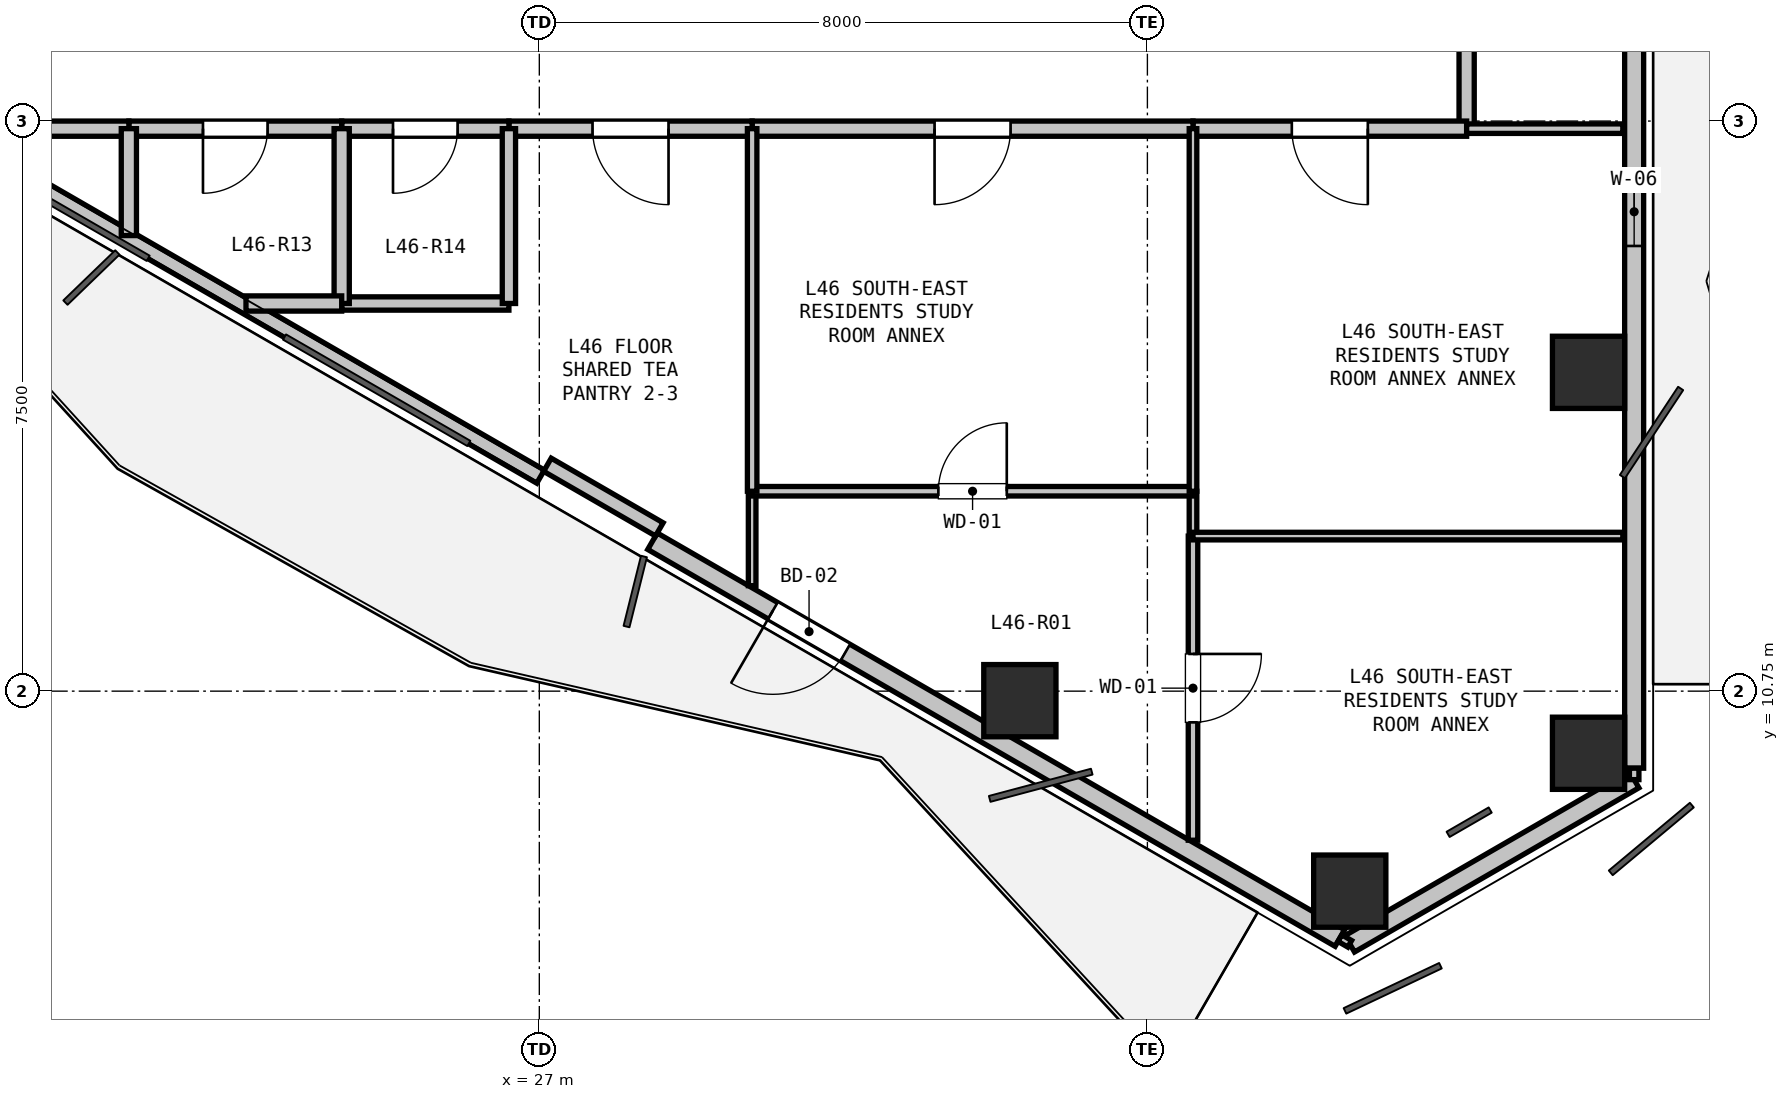
"""IFC4 building model, lengths in metres.
Left out: names, types, materials, properties, quantities, classifications, styles, units other than length and angle.
Written with IfcOpenShell. Run it as: python <this file> out.ifc"""

import sys

from ifc_helpers import new_model, si_unit, direction, frame, frame_2d, origin, origin_2d, place, context, subcontext, project, spatial, rectangle, hollow_rectangle, extrude, element, fill, save


model = new_model("IFC4")
c1 = context("Model", 3, precision=1e-05, world=origin(), true_north=direction((0.0, 1.0)))
c2 = subcontext(c1, "Body", "Model", "MODEL_VIEW")
j1 = project(units=[si_unit("LENGTHUNIT", "METRE"), si_unit("PLANEANGLEUNIT", "RADIAN")], contexts=[c1])
p1 = place(None, origin())
s1 = spatial("IfcSite", under=j1, at=p1, CompositionType="ELEMENT")
p2 = place(p1, origin())
s2 = spatial("IfcBuilding", under=s1, at=p2, CompositionType="ELEMENT")
p3 = place(p2, frame((0.0, 0.0, 167.4)))
s3 = spatial("IfcBuildingStorey", under=s2, at=p3, CompositionType="ELEMENT", Elevation=167.4)
for number, where, z_axis, x_axis in (
    (1, (40.804, 14.944, -0.23), (0.0, 0.0, 1.0), (1.0, 0.0, 0.0)),
    (2, (40.804, 9.933, -0.23), (0.0, 0.0, 1.0), (1.0, 0.0, 0.0)),
    (3, (37.662, 8.119, -0.23), (0.0, 0.0, 1.0), (1.0, 0.0, 0.0)),
    (4, (33.322, 10.625, -0.23), (0.0, 0.0, 1.0), (1.0, 0.0, 0.0)),
):
    element("IfcColumn", number, at=place(p3, frame(where, z_axis=z_axis, x_axis=x_axis)), inside=s3, PredefinedType="COLUMN", context=c2, shape_type="SweptSolid", body=[
        extrude(hollow_rectangle(XDim=0.95, YDim=0.95, WallThickness=0.028, at=origin_2d()), origin(), (0.0, 0.0, 1.0), 3.53),
    ])
p4 = place(p3, frame((41.404, 9.586, 0.0), z_axis=(0.0, 0.0, 1.0), x_axis=(-0.866047252008, -0.499962155857, 0.0)))
e5 = element("IfcWall", 5, at=p4, inside=s3, PredefinedType="SOLIDWALL", context=c2, shape_type="SweptSolid", body=[
    extrude(rectangle(XDim=4.32, YDim=0.25, at=frame_2d((2.16, 0.0))), origin(), (0.0, 0.0, 1.0), 2.64),
])
p5 = place(p3, frame((41.404, 20.179, 0.0), z_axis=(0.0, 0.0, 1.0), x_axis=(0.0, -1.0, 0.0)))
e6 = element("IfcWall", 6, at=p5, inside=s3, PredefinedType="SOLIDWALL", context=c2, shape_type="SweptSolid", body=[
    extrude(rectangle(XDim=10.442, YDim=0.25, at=frame_2d((5.221, 0.0))), origin(), (0.0, 0.0, 1.0), 2.64),
])
p6 = place(p5, frame((2.672, 0.0, 0.9)))
e7 = element("IfcOpeningElement", 7, at=p6, cuts=e6, PredefinedType="OPENING", context=c2, shape_type="SweptSolid", body=[
    extrude(rectangle(XDim=0.9, YDim=1.4, at=frame_2d((0.45, 0.7))), frame((0.0, 0.135, 0.0), z_axis=(0.0, -1.0, 0.0), x_axis=(1.0, 0.0, 0.0)), (0.0, 0.0, 1.0), 0.27),
])
p7 = place(p3, frame((37.532, 7.501, 0.0), z_axis=(0.0, 0.0, 1.0), x_axis=(-0.866027516296, 0.499996341005, 0.0)))
e8 = element("IfcWall", 8, at=p7, inside=s3, PredefinedType="SOLIDWALL", context=c2, shape_type="SweptSolid", body=[
    extrude(rectangle(XDim=10.442, YDim=0.25, at=frame_2d((5.221, 0.0))), origin(), (0.0, 0.0, 1.0), 2.64),
])
p8 = place(p7, frame((7.514, 0.0, 0.0)))
e9 = element("IfcOpeningElement", 9, at=p8, cuts=e8, PredefinedType="OPENING", context=c2, shape_type="SweptSolid", body=[
    extrude(rectangle(XDim=1.1, YDim=2.1, at=frame_2d((0.55, 1.05))), frame((0.0, 0.135, 0.0), z_axis=(0.0, -1.0, 0.0), x_axis=(1.0, 0.0, 0.0)), (0.0, 0.0, 1.0), 0.27),
])
p9 = place(p3, frame((27.017, 13.573, 0.0), z_axis=(0.0, 0.0, 1.0), x_axis=(-0.866026169916, 0.499998673018, 0.0)))
e10 = element("IfcWall", 10, at=p9, inside=s3, PredefinedType="PARAPET", context=c2, shape_type="SweptSolid", body=[
    extrude(rectangle(XDim=9.742, YDim=0.2, at=frame_2d((4.871, 0.0))), origin(), (0.0, 0.0, 1.0), 0.2),
])
p10 = place(p3, frame((28.579, 12.878, 0.0), z_axis=(0.0, 0.0, 1.0), x_axis=(-0.866087547558, 0.499892348375, 0.0)))
e11 = element("IfcWall", 11, at=p10, inside=s3, PredefinedType="PARAPET", context=c2, shape_type="SweptSolid", body=[
    extrude(rectangle(XDim=1.7, YDim=0.2, at=frame_2d((0.85, 0.0))), origin(), (0.0, 0.0, 1.0), 2.64),
])
p11 = place(p3, frame((39.2, 20.75, 0.0), z_axis=(0.0, 0.0, 1.0), x_axis=(0.0, -1.0, 0.0)))
e12 = element("IfcWall", 12, at=p11, inside=s3, PredefinedType="PARTITIONING", context=c2, shape_type="SweptSolid", body=[
    extrude(rectangle(XDim=2.6, YDim=0.2, at=frame_2d((1.3, 0.0))), origin(), (0.0, 0.0, 1.0), 3.02),
])
p12 = place(p3, frame((39.2, 18.15, 0.0), z_axis=(0.0, 0.0, 1.0), x_axis=(-1.0, 0.0, 0.0)))
e13 = element("IfcWall", 13, at=p12, inside=s3, PredefinedType="PARTITIONING", context=c2, shape_type="SweptSolid", body=[
    extrude(rectangle(XDim=3.6, YDim=0.2, at=frame_2d((1.8, 0.0))), origin(), (0.0, 0.0, 1.0), 2.469),
])
p13 = place(p12, frame((1.3, 0.0, 0.0)))
e14 = element("IfcOpeningElement", 14, at=p13, cuts=e13, PredefinedType="OPENING", context=c2, shape_type="SweptSolid", body=[
    extrude(rectangle(XDim=1.0, YDim=2.15, at=frame_2d((0.5, 1.075))), frame((0.0, 0.11, 0.0), z_axis=(0.0, -1.0, 0.0), x_axis=(1.0, 0.0, 0.0)), (0.0, 0.0, 1.0), 0.22),
])
p14 = place(p3, frame((35.6, 18.15, 0.0), z_axis=(0.0, 0.0, 1.0), x_axis=(-1.0, 0.0, 0.0)))
e15 = element("IfcWall", 15, at=p14, inside=s3, PredefinedType="PARTITIONING", context=c2, shape_type="SweptSolid", body=[
    extrude(rectangle(XDim=5.8, YDim=0.2, at=frame_2d((2.9, 0.0))), origin(), (0.0, 0.0, 1.0), 3.02),
])
p15 = place(p14, frame((2.4, 0.0, 0.0)))
e16 = element("IfcOpeningElement", 16, at=p15, cuts=e15, PredefinedType="OPENING", context=c2, shape_type="SweptSolid", body=[
    extrude(rectangle(XDim=1.0, YDim=2.15, at=frame_2d((0.5, 1.075))), frame((0.0, 0.11, 0.0), z_axis=(0.0, -1.0, 0.0), x_axis=(1.0, 0.0, 0.0)), (0.0, 0.0, 1.0), 0.22),
])
p16 = place(p3, frame((29.8, 18.15, 0.0), z_axis=(0.0, 0.0, 1.0), x_axis=(-1.0, 0.0, 0.0)))
e17 = element("IfcWall", 17, at=p16, inside=s3, PredefinedType="PARTITIONING", context=c2, shape_type="SweptSolid", body=[
    extrude(rectangle(XDim=3.2, YDim=0.2, at=frame_2d((1.6, 0.0))), origin(), (0.0, 0.0, 1.0), 3.02),
])
p17 = place(p16, frame((1.1, 0.0, 0.0)))
e18 = element("IfcOpeningElement", 18, at=p17, cuts=e17, PredefinedType="OPENING", context=c2, shape_type="SweptSolid", body=[
    extrude(rectangle(XDim=1.0, YDim=2.15, at=frame_2d((0.5, 1.075))), frame((0.0, 0.11, 0.0), z_axis=(0.0, -1.0, 0.0), x_axis=(1.0, 0.0, 0.0)), (0.0, 0.0, 1.0), 0.22),
])
p18 = place(p3, frame((26.6, 18.15, 0.0), z_axis=(0.0, 0.0, 1.0), x_axis=(-1.0, 0.0, 0.0)))
e19 = element("IfcWall", 19, at=p18, inside=s3, PredefinedType="PARTITIONING", context=c2, shape_type="SweptSolid", body=[
    extrude(rectangle(XDim=2.2, YDim=0.2, at=frame_2d((1.1, 0.0))), origin(), (0.0, 0.0, 1.0), 2.469),
])
p19 = place(p18, frame((0.675, 0.0, 0.0)))
e20 = element("IfcOpeningElement", 20, at=p19, cuts=e19, PredefinedType="OPENING", context=c2, shape_type="SweptSolid", body=[
    extrude(rectangle(XDim=0.85, YDim=2.1, at=frame_2d((0.425, 1.05))), frame((0.0, 0.11, 0.0), z_axis=(0.0, -1.0, 0.0), x_axis=(1.0, 0.0, 0.0)), (0.0, 0.0, 1.0), 0.22),
])
p20 = place(p3, frame((24.4, 18.15, 0.0), z_axis=(0.0, 0.0, 1.0), x_axis=(-1.0, 0.0, 0.0)))
e21 = element("IfcWall", 21, at=p20, inside=s3, PredefinedType="PARTITIONING", context=c2, shape_type="SweptSolid", body=[
    extrude(rectangle(XDim=2.8, YDim=0.2, at=frame_2d((1.4, 0.0))), origin(), (0.0, 0.0, 1.0), 2.469),
])
p21 = place(p20, frame((0.975, 0.0, 0.0)))
e22 = element("IfcOpeningElement", 22, at=p21, cuts=e21, PredefinedType="OPENING", context=c2, shape_type="SweptSolid", body=[
    extrude(rectangle(XDim=0.85, YDim=2.1, at=frame_2d((0.425, 1.05))), frame((0.0, 0.11, 0.0), z_axis=(0.0, -1.0, 0.0), x_axis=(1.0, 0.0, 0.0)), (0.0, 0.0, 1.0), 0.22),
])
p22 = place(p3, frame((21.6, 18.15, 0.0), z_axis=(0.0, 0.0, 1.0), x_axis=(-1.0, 0.0, 0.0)))
e23 = element("IfcWall", 23, at=p22, inside=s3, PredefinedType="PARTITIONING", context=c2, shape_type="SweptSolid", body=[
    extrude(rectangle(XDim=1.6, YDim=0.2, at=frame_2d((0.8, 0.0))), origin(), (0.0, 0.0, 1.0), 2.365),
])
p23 = place(p3, frame((26.6, 15.85, 0.0), z_axis=(0.0, 0.0, 1.0), x_axis=(-1.0, 0.0, 0.0)))
e24 = element("IfcWall", 24, at=p23, inside=s3, PredefinedType="PLUMBINGWALL", context=c2, shape_type="SweptSolid", body=[
    extrude(rectangle(XDim=2.2, YDim=0.175, at=frame_2d((1.1, 0.0))), origin(), (0.0, 0.0, 1.0), 2.365),
])
p24 = place(p3, frame((24.4, 15.85, 0.0), z_axis=(0.0, 0.0, 1.0), x_axis=(0.0, 1.0, 0.0)))
e25 = element("IfcWall", 25, at=p24, inside=s3, PredefinedType="PARTITIONING", context=c2, shape_type="SweptSolid", body=[
    extrude(rectangle(XDim=2.3, YDim=0.2, at=frame_2d((1.15, 0.0))), origin(), (0.0, 0.0, 1.0), 2.365),
])
p25 = place(p3, frame((26.6, 18.15, 0.0), z_axis=(0.0, 0.0, 1.0), x_axis=(0.0, -1.0, 0.0)))
e26 = element("IfcWall", 26, at=p25, inside=s3, PredefinedType="PLUMBINGWALL", context=c2, shape_type="SweptSolid", body=[
    extrude(rectangle(XDim=2.3, YDim=0.175, at=frame_2d((1.15, 0.0))), origin(), (0.0, 0.0, 1.0), 2.469),
])
p26 = place(p3, frame((35.6, 13.38, 0.0), z_axis=(0.0, 0.0, 1.0), x_axis=(0.0, -1.0, 0.0)))
e27 = element("IfcWall", 27, at=p26, inside=s3, PredefinedType="PARTITIONING", context=c2, shape_type="SweptSolid", body=[
    extrude(rectangle(XDim=0.59, YDim=0.1, at=frame_2d((0.295, 0.0))), origin(), (0.0, 0.0, 1.0), 3.02),
])
p27 = place(p3, frame((35.6, 12.79, 0.0), z_axis=(0.0, 0.0, 1.0), x_axis=(0.0, -1.0, 0.0)))
e28 = element("IfcWall", 28, at=p27, inside=s3, PredefinedType="PARTITIONING", context=c2, shape_type="SweptSolid", body=[
    extrude(rectangle(XDim=4.001, YDim=0.125, at=frame_2d((2.0, 0.0))), origin(), (0.0, 0.0, 1.0), 2.685),
])
p28 = place(p27, frame((1.551, 0.0, 0.0)))
e29 = element("IfcOpeningElement", 29, at=p28, cuts=e28, PredefinedType="OPENING", context=c2, shape_type="SweptSolid", body=[
    extrude(rectangle(XDim=0.9, YDim=2.1, at=frame_2d((0.45, 1.05))), frame((0.0, 0.073, 0.0), z_axis=(0.0, -1.0, 0.0), x_axis=(1.0, 0.0, 0.0)), (0.0, 0.0, 1.0), 0.145),
])
p29 = place(p3, frame((29.8, 12.137, 0.0), z_axis=(0.0, 0.0, 1.0), x_axis=(0.0, 1.0, 0.0)))
e30 = element("IfcWall", 30, at=p29, inside=s3, PredefinedType="PARTITIONING", context=c2, shape_type="SweptSolid", body=[
    extrude(rectangle(XDim=1.242, YDim=0.1, at=frame_2d((0.621, 0.0))), origin(), (0.0, 0.0, 1.0), 2.365),
])
p30 = place(p3, frame((29.8, 13.38, 0.0), z_axis=(0.0, 0.0, 1.0), x_axis=(1.0, 0.0, 0.0)))
e31 = element("IfcWall", 31, at=p30, inside=s3, PredefinedType="PARTITIONING", context=c2, shape_type="SweptSolid", body=[
    extrude(rectangle(XDim=5.8, YDim=0.125, at=frame_2d((2.9, 0.0))), origin(), (0.0, 0.0, 1.0), 2.469),
])
p31 = place(p30, frame((2.45, 0.0, 0.0)))
e32 = element("IfcOpeningElement", 32, at=p31, cuts=e31, PredefinedType="OPENING", context=c2, shape_type="SweptSolid", body=[
    extrude(rectangle(XDim=0.9, YDim=2.1, at=frame_2d((0.45, 1.05))), frame((0.0, 0.073, 0.0), z_axis=(0.0, -1.0, 0.0), x_axis=(1.0, 0.0, 0.0)), (0.0, 0.0, 1.0), 0.145),
])
p32 = place(p3, frame((35.6, 18.15, 0.0), z_axis=(0.0, 0.0, 1.0), x_axis=(0.0, -1.0, 0.0)))
e33 = element("IfcWall", 33, at=p32, inside=s3, PredefinedType="PARTITIONING", context=c2, shape_type="SweptSolid", body=[
    extrude(rectangle(XDim=4.77, YDim=0.1, at=frame_2d((2.385, 0.0))), origin(), (0.0, 0.0, 1.0), 3.02),
])
p33 = place(p3, frame((29.8, 13.38, 0.0), z_axis=(0.0, 0.0, 1.0), x_axis=(0.0, 1.0, 0.0)))
e34 = element("IfcWall", 34, at=p33, inside=s3, PredefinedType="PARTITIONING", context=c2, shape_type="SweptSolid", body=[
    extrude(rectangle(XDim=4.77, YDim=0.125, at=frame_2d((2.385, 0.0))), origin(), (0.0, 0.0, 1.0), 2.469),
])
p34 = place(p3, frame((35.6, 12.79, 0.0), z_axis=(0.0, 0.0, 1.0), x_axis=(1.0, 0.0, 0.0)))
e35 = element("IfcWall", 35, at=p34, inside=s3, PredefinedType="PARTITIONING", context=c2, shape_type="SweptSolid", body=[
    extrude(rectangle(XDim=5.655, YDim=0.1, at=frame_2d((2.827, 0.0))), origin(), (0.0, 0.0, 1.0), 2.469),
])
p35 = place(p3, frame((41.404, 9.736, 0.0), z_axis=(0.0, 0.0, 1.0), x_axis=(0.0, -1.0, 0.0)))
e36 = element("IfcWall", 36, at=p35, inside=s3, PredefinedType="PARTITIONING", context=c2, shape_type="SweptSolid", body=[
    extrude(rectangle(XDim=0.15, YDim=0.125, at=frame_2d((0.075, 0.0))), origin(), (0.0, 0.0, 1.0), 3.02),
])
p36 = place(p3, frame((37.662, 7.426, 0.0), z_axis=(0.0, 0.0, 1.0), x_axis=(-0.866131372301, 0.499816412211, 0.0)))
e37 = element("IfcWall", 37, at=p36, inside=s3, PredefinedType="PARTITIONING", context=c2, shape_type="SweptSolid", body=[
    extrude(rectangle(XDim=0.15, YDim=0.1, at=frame_2d((0.075, 0.0))), origin(), (0.0, 0.0, 1.0), 3.02),
])
p37 = place(p3, frame((39.2, 18.15, 0.0), z_axis=(0.0, 0.0, 1.0), x_axis=(1.0, 0.0, 0.0)))
e38 = element("IfcWall", 38, at=p37, inside=s3, PredefinedType="PARTITIONING", context=c2, shape_type="SweptSolid", body=[
    extrude(rectangle(XDim=2.055, YDim=0.125, at=frame_2d((1.027, 0.0))), origin(), (0.0, 0.0, 1.0), 2.365),
])
p38 = place(p3, frame((24.4, 15.85, 0.0), z_axis=(0.0, 0.0, 1.0), x_axis=(-1.0, 0.0, 0.0)))
e39 = element("IfcWall", 39, at=p38, inside=s3, PredefinedType="PARTITIONING", context=c2, shape_type="SweptSolid", body=[
    extrude(rectangle(XDim=1.259, YDim=0.2, at=frame_2d((0.629, 0.0))), origin(), (0.0, 0.0, 1.0), 2.365),
])
p39 = place(p3, frame((21.6, 16.744, 0.0), z_axis=(0.0, 0.0, 1.0), x_axis=(0.0, 1.0, 0.0)))
e40 = element("IfcWall", 40, at=p39, inside=s3, PredefinedType="PARTITIONING", context=c2, shape_type="SweptSolid", body=[
    extrude(rectangle(XDim=1.406, YDim=0.2, at=frame_2d((0.703, 0.0))), origin(), (0.0, 0.0, 1.0), 2.365),
])
p40 = place(p6, origin())
e41 = element("IfcWindow", 41, at=p40, inside=s3, PartitioningType="SINGLE_PANEL", PredefinedType="WINDOW", context=c2, shape_type="SweptSolid", body=[
    extrude(rectangle(XDim=0.9, YDim=1.4, at=frame_2d((0.45, 0.7))), frame((0.0, 0.03, 0.0), z_axis=(0.0, -1.0, 0.0), x_axis=(1.0, 0.0, 0.0)), (0.0, 0.0, 1.0), 0.06),
])
fill(e7, e41)
p41 = place(p8, origin())
e42 = element("IfcDoor", 42, at=p41, inside=s3, OperationType="SINGLE_SWING_RIGHT", PredefinedType="DOOR", context=c2, shape_type="SweptSolid", body=[
    extrude(rectangle(XDim=1.1, YDim=2.1, at=frame_2d((0.55, 1.05))), frame((0.0, 0.025, 0.0), z_axis=(0.0, -1.0, 0.0), x_axis=(1.0, 0.0, 0.0)), (0.0, 0.0, 1.0), 0.05),
])
fill(e9, e42)
p42 = place(p19, origin())
e43 = element("IfcDoor", 43, at=p42, inside=s3, OperationType="SINGLE_SWING_RIGHT", PredefinedType="DOOR", context=c2, shape_type="SweptSolid", body=[
    extrude(rectangle(XDim=0.85, YDim=2.1, at=frame_2d((0.425, 1.05))), frame((0.0, 0.025, 0.0), z_axis=(0.0, -1.0, 0.0), x_axis=(1.0, 0.0, 0.0)), (0.0, 0.0, 1.0), 0.05),
])
fill(e20, e43)
p43 = place(p15, origin())
e44 = element("IfcDoor", 44, at=p43, inside=s3, OperationType="SINGLE_SWING_RIGHT", PredefinedType="DOOR", context=c2, shape_type="SweptSolid", body=[
    extrude(rectangle(XDim=1.0, YDim=2.15, at=frame_2d((0.5, 1.075))), frame((0.0, 0.025, 0.0), z_axis=(0.0, -1.0, 0.0), x_axis=(1.0, 0.0, 0.0)), (0.0, 0.0, 1.0), 0.05),
])
fill(e16, e44)
p44 = place(p13, origin())
e45 = element("IfcDoor", 45, at=p44, inside=s3, OperationType="SINGLE_SWING_LEFT", PredefinedType="DOOR", context=c2, shape_type="SweptSolid", body=[
    extrude(rectangle(XDim=1.0, YDim=2.15, at=frame_2d((0.5, 1.075))), frame((0.0, 0.025, 0.0), z_axis=(0.0, -1.0, 0.0), x_axis=(1.0, 0.0, 0.0)), (0.0, 0.0, 1.0), 0.05),
])
fill(e14, e45)
p45 = place(p21, origin())
e46 = element("IfcDoor", 46, at=p45, inside=s3, OperationType="SINGLE_SWING_RIGHT", PredefinedType="DOOR", context=c2, shape_type="SweptSolid", body=[
    extrude(rectangle(XDim=0.85, YDim=2.1, at=frame_2d((0.425, 1.05))), frame((0.0, 0.025, 0.0), z_axis=(0.0, -1.0, 0.0), x_axis=(1.0, 0.0, 0.0)), (0.0, 0.0, 1.0), 0.05),
])
fill(e22, e46)
p46 = place(p17, origin())
e47 = element("IfcDoor", 47, at=p46, inside=s3, OperationType="SINGLE_SWING_LEFT", PredefinedType="DOOR", context=c2, shape_type="SweptSolid", body=[
    extrude(rectangle(XDim=1.0, YDim=2.15, at=frame_2d((0.5, 1.075))), frame((0.0, 0.025, 0.0), z_axis=(0.0, -1.0, 0.0), x_axis=(1.0, 0.0, 0.0)), (0.0, 0.0, 1.0), 0.05),
])
fill(e18, e47)
p47 = place(p31, origin())
e48 = element("IfcDoor", 48, at=p47, inside=s3, OperationType="SINGLE_SWING_RIGHT", PredefinedType="DOOR", context=c2, shape_type="SweptSolid", body=[
    extrude(rectangle(XDim=0.9, YDim=2.1, at=frame_2d((0.45, 1.05))), frame((0.0, 0.025, 0.0), z_axis=(0.0, -1.0, 0.0), x_axis=(1.0, 0.0, 0.0)), (0.0, 0.0, 1.0), 0.05),
])
fill(e32, e48)
p48 = place(p28, origin())
e49 = element("IfcDoor", 49, at=p48, inside=s3, OperationType="SINGLE_SWING_LEFT", PredefinedType="DOOR", context=c2, shape_type="SweptSolid", body=[
    extrude(rectangle(XDim=0.9, YDim=2.1, at=frame_2d((0.45, 1.05))), frame((0.0, 0.025, 0.0), z_axis=(0.0, -1.0, 0.0), x_axis=(1.0, 0.0, 0.0)), (0.0, 0.0, 1.0), 0.05),
])
fill(e29, e49)
save(model, sys.argv[1])
